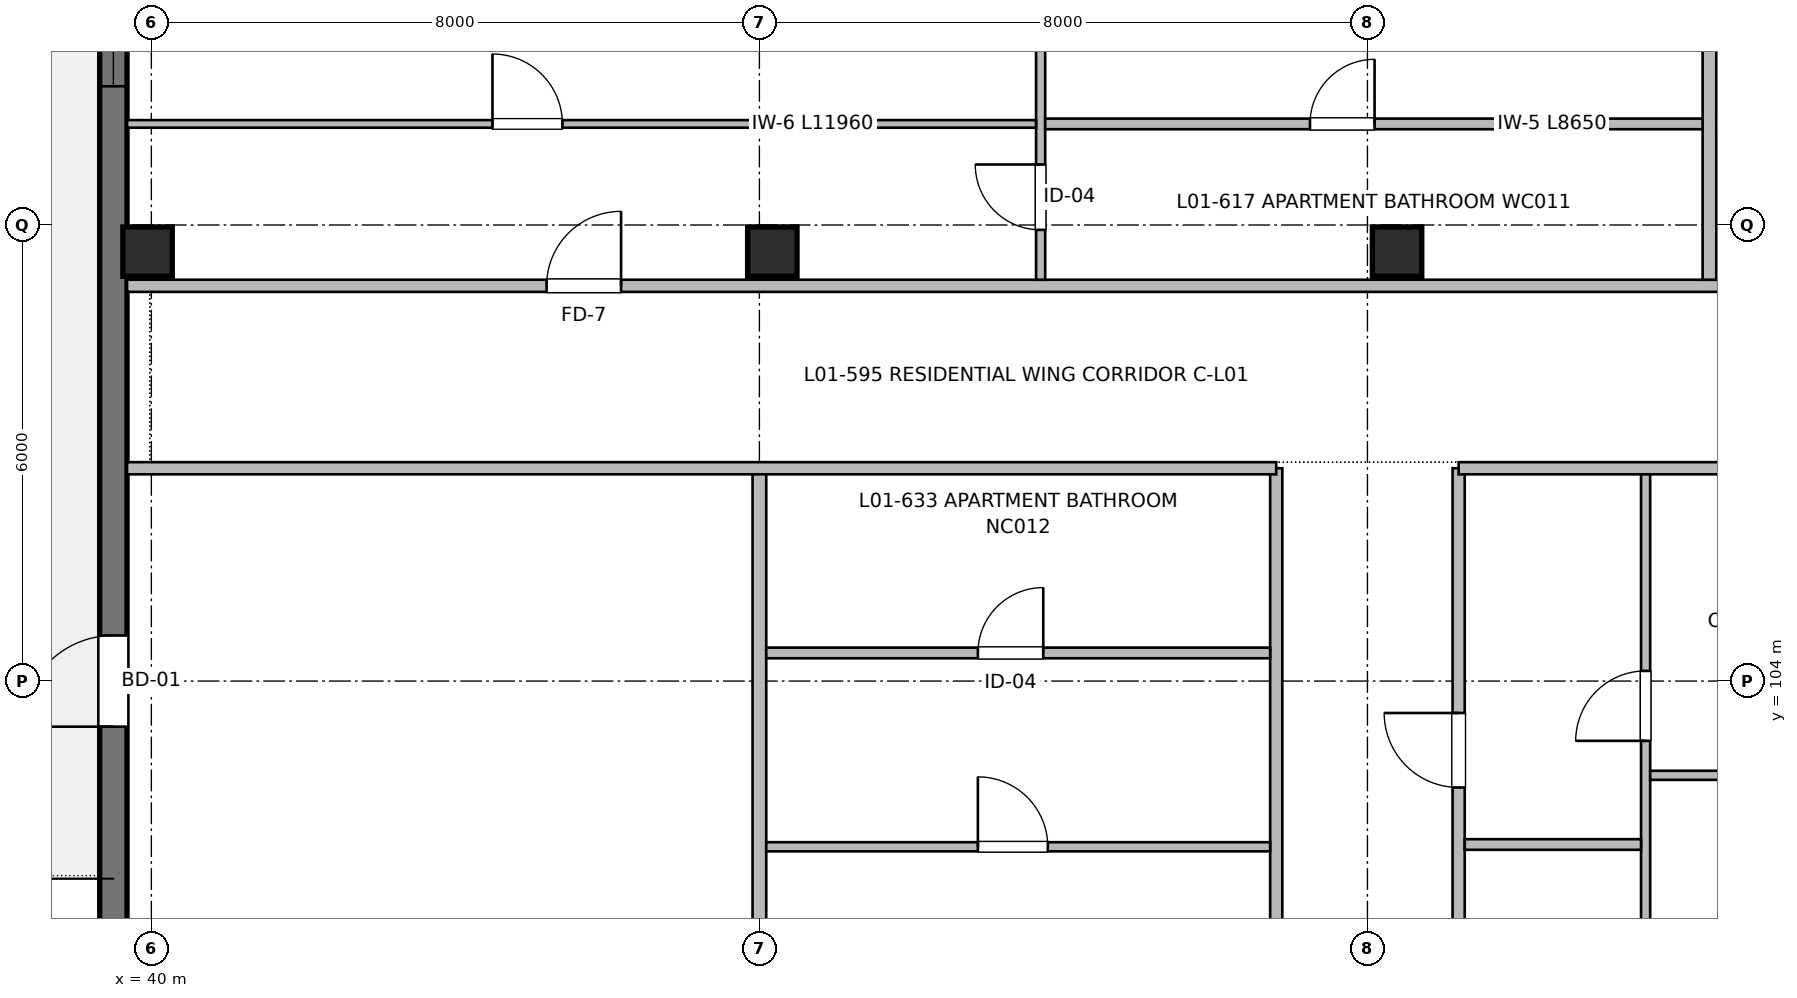
"""IFC4 building model, lengths in metres.
Left out: names, types, materials, properties, quantities, classifications, styles, units other than length and angle.
Written with IfcOpenShell. Run it as: python <this file> out.ifc"""

import sys

from ifc_helpers import new_model, si_unit, direction, frame, frame_2d, origin, origin_2d, place, context, subcontext, project, spatial, rectangle, extrude, element, fill, save


model = new_model("IFC4")
c1 = context("Model", 3, precision=1e-05, world=origin(), true_north=direction((0.0, 1.0)))
c2 = subcontext(c1, "Body", "Model", "MODEL_VIEW")
j1 = project(units=[si_unit("LENGTHUNIT", "METRE"), si_unit("PLANEANGLEUNIT", "RADIAN")], contexts=[c1])
p1 = place(None, origin())
s1 = spatial("IfcSite", under=j1, at=p1, CompositionType="ELEMENT")
p2 = place(p1, origin())
s2 = spatial("IfcBuilding", under=s1, at=p2, CompositionType="ELEMENT")
p3 = place(p2, frame((0.0, 0.0, 4.16)))
s3 = spatial("IfcBuildingStorey", under=s2, at=p3, CompositionType="ELEMENT", Elevation=4.16)
for number, where, z_axis, x_axis in (
    (1, (39.95, 109.65, 0.0), (0.0, 0.0, 1.0), (1.0, 0.0, 0.0)),
    (2, (48.17, 109.65, 0.0), (0.0, 0.0, 1.0), (1.0, 0.0, 0.0)),
    (3, (56.39, 109.65, 0.0), (0.0, 0.0, 1.0), (1.0, 0.0, 0.0)),
):
    element("IfcColumn", number, at=place(p3, frame(where, z_axis=z_axis, x_axis=x_axis)), inside=s3, PredefinedType="COLUMN", context=c2, shape_type="SweptSolid", body=[
        extrude(rectangle(XDim=0.65, YDim=0.65, at=origin_2d()), origin(), (0.0, 0.0, 1.0), 3.2),
    ])
p4 = place(p3, frame((39.5, 100.0, 0.0), z_axis=(0.0, 0.0, 1.0), x_axis=(0.0, 1.0, 0.0)))
e4 = element("IfcWall", 4, at=p4, inside=s3, PredefinedType="SHEAR", context=c2, shape_type="SweptSolid", body=[
    extrude(rectangle(XDim=16.0, YDim=0.36, at=frame_2d((8.0, 0.0))), origin(), (0.0, 0.0, 1.0), 2.98),
])
p5 = place(p4, frame((3.4, 0.0, 0.0)))
e5 = element("IfcOpeningElement", 5, at=p5, cuts=e4, PredefinedType="OPENING", context=c2, shape_type="SweptSolid", body=[
    extrude(rectangle(XDim=1.2, YDim=2.2, at=frame_2d((0.6, 1.1))), frame((0.0, 0.19, 0.0), z_axis=(0.0, -1.0, 0.0), x_axis=(1.0, 0.0, 0.0)), (0.0, 0.0, 1.0), 0.38),
])
p6 = place(p4, frame((11.825, 0.0, 0.87)))
e6 = element("IfcOpeningElement", 6, at=p6, cuts=e4, PredefinedType="OPENING", context=c2, shape_type="SweptSolid", body=[
    extrude(rectangle(XDim=1.25, YDim=1.35, at=frame_2d((0.625, 0.675))), frame((0.0, 0.19, 0.0), z_axis=(0.0, -1.0, 0.0), x_axis=(1.0, 0.0, 0.0)), (0.0, 0.0, 1.0), 0.38),
])
p7 = place(p3, frame((54.8, 56.18, 0.0), z_axis=(0.0, 0.0, 1.0), x_axis=(0.0, 1.0, 0.0)))
e7 = element("IfcWall", 7, at=p7, inside=s3, PredefinedType="PARTITIONING", context=c2, shape_type="SweptSolid", body=[
    extrude(rectangle(XDim=50.62, YDim=0.16, at=frame_2d((25.31, 0.0))), origin(), (0.0, 0.0, 1.0), 2.935),
])
p8 = place(p7, frame((12.82, 0.0, 0.0)))
e8 = element("IfcOpeningElement", 8, at=p8, cuts=e7, PredefinedType="OPENING", context=c2, shape_type="SweptSolid", body=[
    extrude(rectangle(XDim=1.1, YDim=2.15, at=frame_2d((0.55, 1.075))), frame((0.0, 0.09, 0.0), z_axis=(0.0, -1.0, 0.0), x_axis=(1.0, 0.0, 0.0)), (0.0, 0.0, 1.0), 0.18),
])
p9 = place(p7, frame((19.22, 0.0, 0.0)))
e9 = element("IfcOpeningElement", 9, at=p9, cuts=e7, PredefinedType="OPENING", context=c2, shape_type="SweptSolid", body=[
    extrude(rectangle(XDim=1.6, YDim=2.15, at=frame_2d((0.8, 1.075))), frame((0.0, 0.09, 0.0), z_axis=(0.0, -1.0, 0.0), x_axis=(1.0, 0.0, 0.0)), (0.0, 0.0, 1.0), 0.18),
])
p10 = place(p7, frame((1.8, 0.0, 0.0)))
e10 = element("IfcOpeningElement", 10, at=p10, cuts=e7, PredefinedType="OPENING", context=c2, shape_type="SweptSolid", body=[
    extrude(rectangle(XDim=0.96, YDim=2.15, at=frame_2d((0.48, 1.075))), frame((0.0, 0.09, 0.0), z_axis=(0.0, -1.0, 0.0), x_axis=(1.0, 0.0, 0.0)), (0.0, 0.0, 1.0), 0.18),
])
p11 = place(p7, frame((32.725, 0.0, 0.0)))
e11 = element("IfcOpeningElement", 11, at=p11, cuts=e7, PredefinedType="OPENING", context=c2, shape_type="SweptSolid", body=[
    extrude(rectangle(XDim=0.98, YDim=2.15, at=frame_2d((0.49, 1.075))), frame((0.0, 0.09, 0.0), z_axis=(0.0, -1.0, 0.0), x_axis=(1.0, 0.0, 0.0)), (0.0, 0.0, 1.0), 0.18),
])
p12 = place(p7, frame((40.935, 0.0, 0.0)))
e12 = element("IfcOpeningElement", 12, at=p12, cuts=e7, PredefinedType="OPENING", context=c2, shape_type="SweptSolid", body=[
    extrude(rectangle(XDim=0.98, YDim=2.15, at=frame_2d((0.49, 1.075))), frame((0.0, 0.09, 0.0), z_axis=(0.0, -1.0, 0.0), x_axis=(1.0, 0.0, 0.0)), (0.0, 0.0, 1.0), 0.18),
])
p13 = place(p3, frame((57.2, 56.18, 0.0), z_axis=(0.0, 0.0, 1.0), x_axis=(0.0, 1.0, 0.0)))
e13 = element("IfcWall", 13, at=p13, inside=s3, PredefinedType="PARTITIONING", context=c2, shape_type="SweptSolid", body=[
    extrude(rectangle(XDim=50.62, YDim=0.16, at=frame_2d((25.31, 0.0))), origin(), (0.0, 0.0, 1.0), 2.935),
])
p14 = place(p13, frame((7.68, 0.0, 0.0)))
e14 = element("IfcOpeningElement", 14, at=p14, cuts=e13, PredefinedType="OPENING", context=c2, shape_type="SweptSolid", body=[
    extrude(rectangle(XDim=0.98, YDim=2.15, at=frame_2d((0.49, 1.075))), frame((0.0, 0.09, 0.0), z_axis=(0.0, -1.0, 0.0), x_axis=(1.0, 0.0, 0.0)), (0.0, 0.0, 1.0), 0.18),
])
p15 = place(p13, frame((22.43, 0.0, 0.0)))
e15 = element("IfcOpeningElement", 15, at=p15, cuts=e13, PredefinedType="OPENING", context=c2, shape_type="SweptSolid", body=[
    extrude(rectangle(XDim=1.02, YDim=2.15, at=frame_2d((0.51, 1.075))), frame((0.0, 0.09, 0.0), z_axis=(0.0, -1.0, 0.0), x_axis=(1.0, 0.0, 0.0)), (0.0, 0.0, 1.0), 0.18),
])
p16 = place(p13, frame((35.65, 0.0, 0.0)))
e16 = element("IfcOpeningElement", 16, at=p16, cuts=e13, PredefinedType="OPENING", context=c2, shape_type="SweptSolid", body=[
    extrude(rectangle(XDim=0.98, YDim=2.15, at=frame_2d((0.49, 1.075))), frame((0.0, 0.09, 0.0), z_axis=(0.0, -1.0, 0.0), x_axis=(1.0, 0.0, 0.0)), (0.0, 0.0, 1.0), 0.18),
])
p17 = place(p13, frame((46.42, 0.0, 0.0)))
e17 = element("IfcOpeningElement", 17, at=p17, cuts=e13, PredefinedType="OPENING", context=c2, shape_type="SweptSolid", body=[
    extrude(rectangle(XDim=0.98, YDim=2.15, at=frame_2d((0.49, 1.075))), frame((0.0, 0.09, 0.0), z_axis=(0.0, -1.0, 0.0), x_axis=(1.0, 0.0, 0.0)), (0.0, 0.0, 1.0), 0.18),
])
p18 = place(p3, frame((39.68, 106.8, 0.0), z_axis=(0.0, 0.0, 1.0), x_axis=(1.0, 0.0, 0.0)))
e18 = element("IfcWall", 18, at=p18, inside=s3, PredefinedType="PARTITIONING", context=c2, shape_type="SweptSolid", body=[
    extrude(rectangle(XDim=15.12, YDim=0.16, at=frame_2d((7.56, 0.0))), origin(), (0.0, 0.0, 1.0), 2.935),
])
p19 = place(p3, frame((57.2, 106.8, 0.0), z_axis=(0.0, 0.0, 1.0), x_axis=(1.0, 0.0, 0.0)))
e19 = element("IfcWall", 19, at=p19, inside=s3, PredefinedType="PARTITIONING", context=c2, shape_type="SweptSolid", body=[
    extrude(rectangle(XDim=24.12, YDim=0.16, at=frame_2d((12.06, 0.0))), origin(), (0.0, 0.0, 1.0), 2.935),
])
p20 = place(p19, frame((19.575, 0.0, 0.0)))
e20 = element("IfcOpeningElement", 20, at=p20, cuts=e19, PredefinedType="OPENING", context=c2, shape_type="SweptSolid", body=[
    extrude(rectangle(XDim=1.05, YDim=2.15, at=frame_2d((0.525, 1.075))), frame((0.0, 0.09, 0.0), z_axis=(0.0, -1.0, 0.0), x_axis=(1.0, 0.0, 0.0)), (0.0, 0.0, 1.0), 0.18),
])
p21 = place(p19, frame((8.995, 0.0, 0.0)))
e21 = element("IfcOpeningElement", 21, at=p21, cuts=e19, PredefinedType="OPENING", context=c2, shape_type="SweptSolid", body=[
    extrude(rectangle(XDim=0.98, YDim=2.15, at=frame_2d((0.49, 1.075))), frame((0.0, 0.09, 0.0), z_axis=(0.0, -1.0, 0.0), x_axis=(1.0, 0.0, 0.0)), (0.0, 0.0, 1.0), 0.18),
])
p22 = place(p3, frame((39.68, 109.2, 0.0), z_axis=(0.0, 0.0, 1.0), x_axis=(1.0, 0.0, 0.0)))
e22 = element("IfcWall", 22, at=p22, inside=s3, PredefinedType="PARTITIONING", context=c2, shape_type="SweptSolid", body=[
    extrude(rectangle(XDim=41.64, YDim=0.16, at=frame_2d((20.82, 0.0))), origin(), (0.0, 0.0, 1.0), 2.935),
])
p23 = place(p22, frame((5.52, 0.0, 0.0)))
e23 = element("IfcOpeningElement", 23, at=p23, cuts=e22, PredefinedType="OPENING", context=c2, shape_type="SweptSolid", body=[
    extrude(rectangle(XDim=0.98, YDim=2.15, at=frame_2d((0.49, 1.075))), frame((0.0, 0.09, 0.0), z_axis=(0.0, -1.0, 0.0), x_axis=(1.0, 0.0, 0.0)), (0.0, 0.0, 1.0), 0.18),
])
p24 = place(p22, frame((26.43, 0.0, 0.0)))
e24 = element("IfcOpeningElement", 24, at=p24, cuts=e22, PredefinedType="OPENING", context=c2, shape_type="SweptSolid", body=[
    extrude(rectangle(XDim=0.98, YDim=2.15, at=frame_2d((0.49, 1.075))), frame((0.0, 0.09, 0.0), z_axis=(0.0, -1.0, 0.0), x_axis=(1.0, 0.0, 0.0)), (0.0, 0.0, 1.0), 0.18),
])
p25 = place(p3, frame((48.0, 100.05, 0.0), z_axis=(0.0, 0.0, 1.0), x_axis=(0.0, 1.0, 0.0)))
e25 = element("IfcWall", 25, at=p25, inside=s3, PredefinedType="PARTITIONING", context=c2, shape_type="SweptSolid", body=[
    extrude(rectangle(XDim=6.67, YDim=0.18, at=frame_2d((3.335, 0.0))), origin(), (0.0, 0.0, 1.0), 2.68),
])
p26 = place(p3, frame((59.66, 97.71, 0.0), z_axis=(0.0, 0.0, 1.0), x_axis=(0.0, 1.0, 0.0)))
e26 = element("IfcWall", 26, at=p26, inside=s3, PredefinedType="PARTITIONING", context=c2, shape_type="SweptSolid", body=[
    extrude(rectangle(XDim=9.01, YDim=0.12, at=frame_2d((4.505, 0.0))), origin(), (0.0, 0.0, 1.0), 2.935),
])
p27 = place(p26, frame((1.573, 0.0, 0.0)))
e27 = element("IfcOpeningElement", 27, at=p27, cuts=e26, PredefinedType="OPENING", context=c2, shape_type="SweptSolid", body=[
    extrude(rectangle(XDim=0.86, YDim=2.1, at=frame_2d((0.43, 1.05))), frame((0.0, 0.07, 0.0), z_axis=(0.0, -1.0, 0.0), x_axis=(1.0, 0.0, 0.0)), (0.0, 0.0, 1.0), 0.14),
])
p28 = place(p26, frame((5.504, 0.0, 0.0)))
e28 = element("IfcOpeningElement", 28, at=p28, cuts=e26, PredefinedType="OPENING", context=c2, shape_type="SweptSolid", body=[
    extrude(rectangle(XDim=0.92, YDim=2.1, at=frame_2d((0.46, 1.05))), frame((0.0, 0.07, 0.0), z_axis=(0.0, -1.0, 0.0), x_axis=(1.0, 0.0, 0.0)), (0.0, 0.0, 1.0), 0.14),
])
p29 = place(p3, frame((57.28, 101.85, 0.0), z_axis=(0.0, 0.0, 1.0), x_axis=(1.0, 0.0, 0.0)))
e29 = element("IfcWall", 29, at=p29, inside=s3, PredefinedType="PARTITIONING", context=c2, shape_type="SweptSolid", body=[
    extrude(rectangle(XDim=2.32, YDim=0.14, at=frame_2d((1.16, 0.0))), origin(), (0.0, 0.0, 1.0), 2.935),
])
p30 = place(p3, frame((59.72, 102.76, 0.0), z_axis=(0.0, 0.0, 1.0), x_axis=(1.0, 0.0, 0.0)))
e30 = element("IfcWall", 30, at=p30, inside=s3, PredefinedType="PARTITIONING", context=c2, shape_type="SweptSolid", body=[
    extrude(rectangle(XDim=4.19, YDim=0.12, at=frame_2d((2.095, 0.0))), origin(), (0.0, 0.0, 1.0), 2.935),
])
p31 = place(p30, frame((1.645, 0.0, 0.0)))
e31 = element("IfcOpeningElement", 31, at=p31, cuts=e30, PredefinedType="OPENING", context=c2, shape_type="SweptSolid", body=[
    extrude(rectangle(XDim=0.9, YDim=2.1, at=frame_2d((0.45, 1.05))), frame((0.0, 0.07, 0.0), z_axis=(0.0, -1.0, 0.0), x_axis=(1.0, 0.0, 0.0)), (0.0, 0.0, 1.0), 0.14),
])
p32 = place(p3, frame((60.5, 109.28, 0.0), z_axis=(0.0, 0.0, 1.0), x_axis=(0.0, 1.0, 0.0)))
e32 = element("IfcWall", 32, at=p32, inside=s3, PredefinedType="PARTITIONING", context=c2, shape_type="SweptSolid", body=[
    extrude(rectangle(XDim=6.59, YDim=0.18, at=frame_2d((3.295, 0.0))), origin(), (0.0, 0.0, 1.0), 2.67),
])
p33 = place(p3, frame((51.7, 109.28, 0.0), z_axis=(0.0, 0.0, 1.0), x_axis=(0.0, 1.0, 0.0)))
e33 = element("IfcWall", 33, at=p33, inside=s3, PredefinedType="PARTITIONING", context=c2, shape_type="SweptSolid", body=[
    extrude(rectangle(XDim=6.59, YDim=0.12, at=frame_2d((3.295, 0.0))), origin(), (0.0, 0.0, 1.0), 2.935),
])
p34 = place(p33, frame((0.656, 0.0, 0.0)))
e34 = element("IfcOpeningElement", 34, at=p34, cuts=e33, PredefinedType="OPENING", context=c2, shape_type="SweptSolid", body=[
    extrude(rectangle(XDim=0.86, YDim=2.1, at=frame_2d((0.43, 1.05))), frame((0.0, 0.07, 0.0), z_axis=(0.0, -1.0, 0.0), x_axis=(1.0, 0.0, 0.0)), (0.0, 0.0, 1.0), 0.14),
])
p35 = place(p33, frame((4.093, 0.0, 0.0)))
e35 = element("IfcOpeningElement", 35, at=p35, cuts=e33, PredefinedType="OPENING", context=c2, shape_type="SweptSolid", body=[
    extrude(rectangle(XDim=0.9, YDim=2.1, at=frame_2d((0.45, 1.05))), frame((0.0, 0.07, 0.0), z_axis=(0.0, -1.0, 0.0), x_axis=(1.0, 0.0, 0.0)), (0.0, 0.0, 1.0), 0.14),
])
p36 = place(p3, frame((51.76, 111.33, 0.0), z_axis=(0.0, 0.0, 1.0), x_axis=(1.0, 0.0, 0.0)))
e36 = element("IfcWall", 36, at=p36, inside=s3, PredefinedType="PARTITIONING", context=c2, shape_type="SweptSolid", body=[
    extrude(rectangle(XDim=8.65, YDim=0.14, at=frame_2d((4.325, 0.0))), origin(), (0.0, 0.0, 1.0), 2.935),
])
p37 = place(p36, frame((3.484, 0.0, 0.0)))
e37 = element("IfcOpeningElement", 37, at=p37, cuts=e36, PredefinedType="OPENING", context=c2, shape_type="SweptSolid", body=[
    extrude(rectangle(XDim=0.85, YDim=2.05, at=frame_2d((0.425, 1.025))), frame((0.0, 0.08, 0.0), z_axis=(0.0, -1.0, 0.0), x_axis=(1.0, 0.0, 0.0)), (0.0, 0.0, 1.0), 0.16),
])
p38 = place(p3, frame((39.68, 111.33, 0.0), z_axis=(0.0, 0.0, 1.0), x_axis=(1.0, 0.0, 0.0)))
e38 = element("IfcWall", 38, at=p38, inside=s3, PredefinedType="PARTITIONING", context=c2, shape_type="SweptSolid", body=[
    extrude(rectangle(XDim=11.96, YDim=0.1, at=frame_2d((5.98, 0.0))), origin(), (0.0, 0.0, 1.0), 2.935),
])
p39 = place(p38, frame((4.808, 0.0, 0.0)))
e39 = element("IfcOpeningElement", 39, at=p39, cuts=e38, PredefinedType="OPENING", context=c2, shape_type="SweptSolid", body=[
    extrude(rectangle(XDim=0.92, YDim=2.1, at=frame_2d((0.46, 1.05))), frame((0.0, 0.06, 0.0), z_axis=(0.0, -1.0, 0.0), x_axis=(1.0, 0.0, 0.0)), (0.0, 0.0, 1.0), 0.12),
])
p40 = place(p3, frame((60.59, 111.33, 0.0), z_axis=(0.0, 0.0, 1.0), x_axis=(1.0, 0.0, 0.0)))
e40 = element("IfcWall", 40, at=p40, inside=s3, PredefinedType="PARTITIONING", context=c2, shape_type="SweptSolid", body=[
    extrude(rectangle(XDim=11.96, YDim=0.1, at=frame_2d((5.98, 0.0))), origin(), (0.0, 0.0, 1.0), 2.935),
])
p41 = place(p40, frame((4.808, 0.0, 0.0)))
e41 = element("IfcOpeningElement", 41, at=p41, cuts=e40, PredefinedType="OPENING", context=c2, shape_type="SweptSolid", body=[
    extrude(rectangle(XDim=0.92, YDim=2.1, at=frame_2d((0.46, 1.05))), frame((0.0, 0.06, 0.0), z_axis=(0.0, -1.0, 0.0), x_axis=(1.0, 0.0, 0.0)), (0.0, 0.0, 1.0), 0.12),
])
p42 = place(p3, frame((48.09, 101.82, 0.0), z_axis=(0.0, 0.0, 1.0), x_axis=(1.0, 0.0, 0.0)))
e42 = element("IfcWall", 42, at=p42, inside=s3, PredefinedType="PARTITIONING", context=c2, shape_type="SweptSolid", body=[
    extrude(rectangle(XDim=6.63, YDim=0.12, at=frame_2d((3.315, 0.0))), origin(), (0.0, 0.0, 1.0), 2.935),
])
p43 = place(p42, frame((2.785, 0.0, 0.0)))
e43 = element("IfcOpeningElement", 43, at=p43, cuts=e42, PredefinedType="OPENING", context=c2, shape_type="SweptSolid", body=[
    extrude(rectangle(XDim=0.92, YDim=2.1, at=frame_2d((0.46, 1.05))), frame((0.0, 0.07, 0.0), z_axis=(0.0, -1.0, 0.0), x_axis=(1.0, 0.0, 0.0)), (0.0, 0.0, 1.0), 0.14),
])
p44 = place(p3, frame((48.09, 104.37, 0.0), z_axis=(0.0, 0.0, 1.0), x_axis=(1.0, 0.0, 0.0)))
e44 = element("IfcWall", 44, at=p44, inside=s3, PredefinedType="PARTITIONING", context=c2, shape_type="SweptSolid", body=[
    extrude(rectangle(XDim=6.63, YDim=0.14, at=frame_2d((3.315, 0.0))), origin(), (0.0, 0.0, 1.0), 2.935),
])
p45 = place(p44, frame((2.785, 0.0, 0.0)))
e45 = element("IfcOpeningElement", 45, at=p45, cuts=e44, PredefinedType="OPENING", context=c2, shape_type="SweptSolid", body=[
    extrude(rectangle(XDim=0.86, YDim=2.1, at=frame_2d((0.43, 1.05))), frame((0.0, 0.08, 0.0), z_axis=(0.0, -1.0, 0.0), x_axis=(1.0, 0.0, 0.0)), (0.0, 0.0, 1.0), 0.16),
])
p46 = place(p5, origin())
e46 = element("IfcDoor", 46, at=p46, inside=s3, OperationType="SINGLE_SWING_LEFT", PredefinedType="DOOR", context=c2, shape_type="SweptSolid", body=[
    extrude(rectangle(XDim=1.2, YDim=2.2, at=frame_2d((0.6, 1.1))), frame((0.0, 0.025, 0.0), z_axis=(0.0, -1.0, 0.0), x_axis=(1.0, 0.0, 0.0)), (0.0, 0.0, 1.0), 0.05),
])
fill(e5, e46)
p47 = place(p6, origin())
e47 = element("IfcWindow", 47, at=p47, inside=s3, PartitioningType="SINGLE_PANEL", PredefinedType="WINDOW", context=c2, shape_type="SweptSolid", body=[
    extrude(rectangle(XDim=1.25, YDim=1.35, at=frame_2d((0.625, 0.675))), frame((0.0, 0.03, 0.0), z_axis=(0.0, -1.0, 0.0), x_axis=(1.0, 0.0, 0.0)), (0.0, 0.0, 1.0), 0.06),
])
fill(e6, e47)
p48 = place(p28, origin())
e48 = element("IfcDoor", 48, at=p48, inside=s3, OperationType="SINGLE_SWING_LEFT", PredefinedType="DOOR", context=c2, shape_type="SweptSolid", body=[
    extrude(rectangle(XDim=0.92, YDim=2.1, at=frame_2d((0.46, 1.05))), frame((0.0, 0.025, 0.0), z_axis=(0.0, -1.0, 0.0), x_axis=(1.0, 0.0, 0.0)), (0.0, 0.0, 1.0), 0.05),
])
fill(e28, e48)
p49 = place(p17, origin())
e49 = element("IfcDoor", 49, at=p49, inside=s3, OperationType="SINGLE_SWING_RIGHT", PredefinedType="DOOR", context=c2, shape_type="SweptSolid", body=[
    extrude(rectangle(XDim=0.98, YDim=2.15, at=frame_2d((0.49, 1.075))), frame((0.0, 0.025, 0.0), z_axis=(0.0, -1.0, 0.0), x_axis=(1.0, 0.0, 0.0)), (0.0, 0.0, 1.0), 0.05),
])
fill(e17, e49)
p50 = place(p23, origin())
e50 = element("IfcDoor", 50, at=p50, inside=s3, OperationType="SINGLE_SWING_RIGHT", PredefinedType="DOOR", context=c2, shape_type="SweptSolid", body=[
    extrude(rectangle(XDim=0.98, YDim=2.15, at=frame_2d((0.49, 1.075))), frame((0.0, 0.025, 0.0), z_axis=(0.0, -1.0, 0.0), x_axis=(1.0, 0.0, 0.0)), (0.0, 0.0, 1.0), 0.05),
])
fill(e23, e50)
p51 = place(p39, origin())
e51 = element("IfcDoor", 51, at=p51, inside=s3, OperationType="SINGLE_SWING_LEFT", PredefinedType="DOOR", context=c2, shape_type="SweptSolid", body=[
    extrude(rectangle(XDim=0.92, YDim=2.1, at=frame_2d((0.46, 1.05))), frame((0.0, 0.025, 0.0), z_axis=(0.0, -1.0, 0.0), x_axis=(1.0, 0.0, 0.0)), (0.0, 0.0, 1.0), 0.05),
])
fill(e39, e51)
p52 = place(p34, origin())
e52 = element("IfcDoor", 52, at=p52, inside=s3, OperationType="SINGLE_SWING_RIGHT", PredefinedType="DOOR", context=c2, shape_type="SweptSolid", body=[
    extrude(rectangle(XDim=0.86, YDim=2.1, at=frame_2d((0.43, 1.05))), frame((0.0, 0.025, 0.0), z_axis=(0.0, -1.0, 0.0), x_axis=(1.0, 0.0, 0.0)), (0.0, 0.0, 1.0), 0.05),
])
fill(e34, e52)
p53 = place(p37, origin())
e53 = element("IfcDoor", 53, at=p53, inside=s3, OperationType="SINGLE_SWING_RIGHT", PredefinedType="DOOR", context=c2, shape_type="SweptSolid", body=[
    extrude(rectangle(XDim=0.85, YDim=2.05, at=frame_2d((0.425, 1.025))), frame((0.0, 0.025, 0.0), z_axis=(0.0, -1.0, 0.0), x_axis=(1.0, 0.0, 0.0)), (0.0, 0.0, 1.0), 0.05),
])
fill(e37, e53)
p54 = place(p45, origin())
e54 = element("IfcDoor", 54, at=p54, inside=s3, OperationType="SINGLE_SWING_RIGHT", PredefinedType="DOOR", context=c2, shape_type="SweptSolid", body=[
    extrude(rectangle(XDim=0.86, YDim=2.1, at=frame_2d((0.43, 1.05))), frame((0.0, 0.025, 0.0), z_axis=(0.0, -1.0, 0.0), x_axis=(1.0, 0.0, 0.0)), (0.0, 0.0, 1.0), 0.05),
])
fill(e45, e54)
p55 = place(p43, origin())
e55 = element("IfcDoor", 55, at=p55, inside=s3, OperationType="SINGLE_SWING_LEFT", PredefinedType="DOOR", context=c2, shape_type="SweptSolid", body=[
    extrude(rectangle(XDim=0.92, YDim=2.1, at=frame_2d((0.46, 1.05))), frame((0.0, 0.025, 0.0), z_axis=(0.0, -1.0, 0.0), x_axis=(1.0, 0.0, 0.0)), (0.0, 0.0, 1.0), 0.05),
])
fill(e43, e55)
save(model, sys.argv[1])
